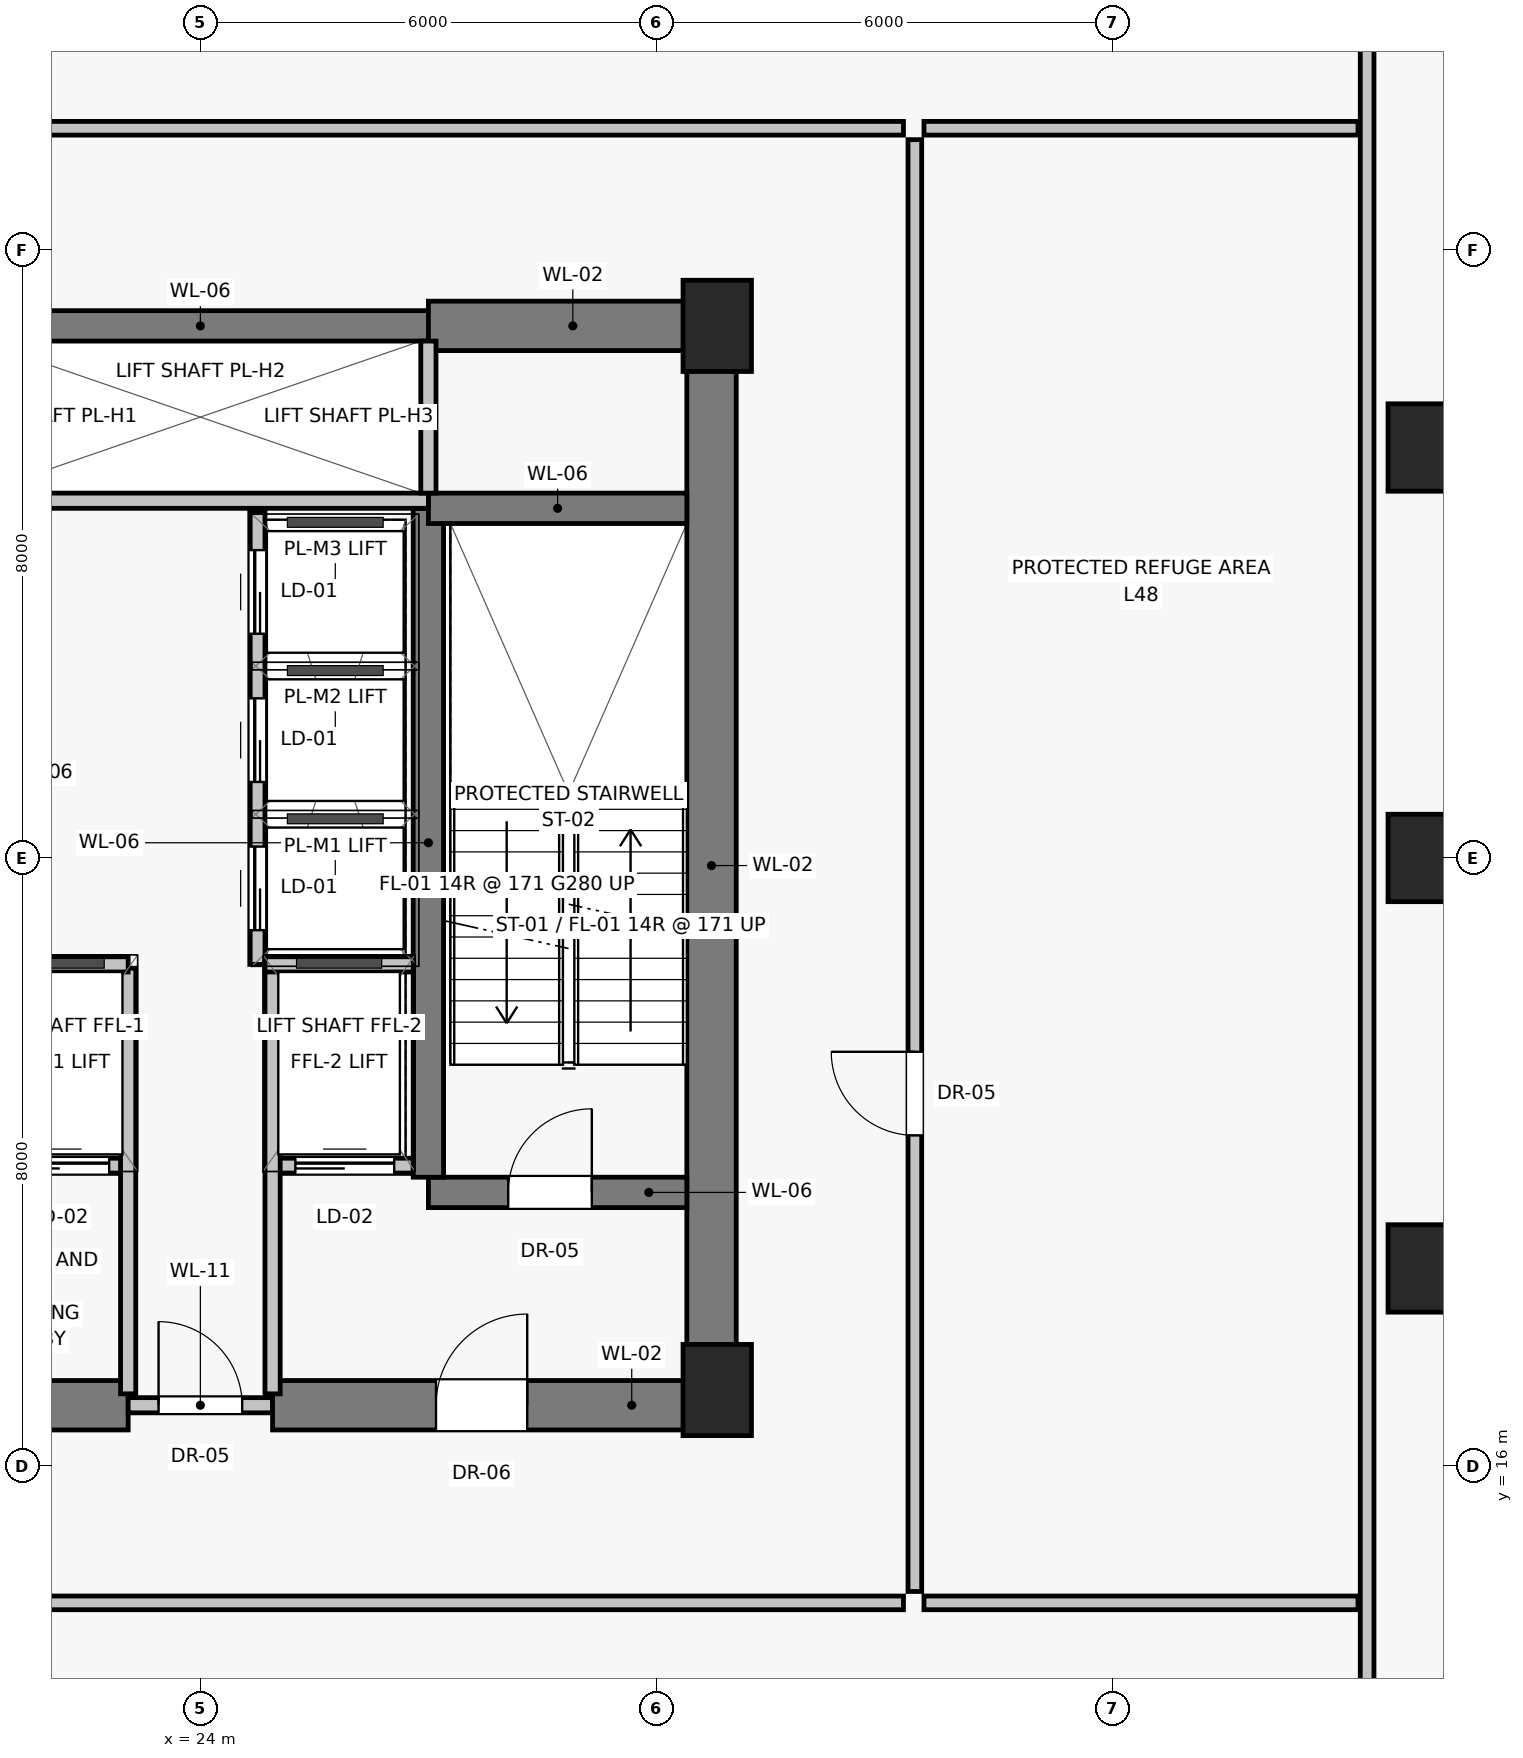
"""IFC4 building model, lengths in metres.
Left out: names, types, materials, properties, quantities, classifications, styles, units other than length and angle.
Written with IfcOpenShell. Run it as: python <this file> out.ifc"""

import sys

from ifc_helpers import new_model, si_unit, direction, frame, frame_2d, origin, origin_2d, place, context, subcontext, project, spatial, rectangle, extrude, source, transform, mapped, element, fill, save


model = new_model("IFC4")
c1 = context("Model", 3, precision=1e-05, world=origin(), true_north=direction((0.0, 1.0)))
c2 = subcontext(c1, "Body", "Model", "MODEL_VIEW")
j1 = project(units=[si_unit("LENGTHUNIT", "METRE"), si_unit("PLANEANGLEUNIT", "RADIAN")], contexts=[c1])
p1 = place(None, origin())
s1 = spatial("IfcSite", under=j1, at=p1, CompositionType="ELEMENT")
p2 = place(p1, origin())
s2 = spatial("IfcBuilding", under=s1, at=p2, CompositionType="ELEMENT")
p3 = place(p2, frame((0.0, 0.0, 169.55)))
s3 = spatial("IfcBuildingStorey", under=s2, at=p3, CompositionType="ELEMENT", Elevation=169.55)
for number, where, z_axis, x_axis in (
    (1, (30.8, 17.0, 0.0), (0.0, 0.0, 1.0), (1.0, 0.0, 0.0)),
    (2, (30.8, 31.0, 0.0), (0.0, 0.0, 1.0), (1.0, 0.0, 0.0)),
):
    element("IfcColumn", number, at=place(p3, frame(where, z_axis=z_axis, x_axis=x_axis)), inside=s3, PredefinedType="PILASTER", context=c2, shape_type="SweptSolid", body=[
        extrude(rectangle(XDim=0.9, YDim=1.2, at=origin_2d()), origin(), (0.0, 0.0, 1.0), 4.8),
    ])
for number, where, z_axis, x_axis in (
    (3, (40.2, 18.6, 0.0), (0.0, 0.0, 1.0), (1.0, 0.0, 0.0)),
    (4, (40.2, 24.0, 0.0), (0.0, 0.0, 1.0), (1.0, 0.0, 0.0)),
    (5, (40.2, 29.4, 0.0), (0.0, 0.0, 1.0), (1.0, 0.0, 0.0)),
):
    element("IfcColumn", number, at=place(p3, frame(where, z_axis=z_axis, x_axis=x_axis)), inside=s3, PredefinedType="COLUMN", context=c2, shape_type="SweptSolid", body=[
        extrude(rectangle(XDim=1.15, YDim=1.15, at=origin_2d()), origin(), (0.0, 0.0, 1.0), 4.8),
    ])
p4 = place(p3, frame((30.725, 16.8, 0.0), z_axis=(0.0, 0.0, 1.0), x_axis=(0.0, 1.0, 0.0)))
e6 = element("IfcWall", 6, at=p4, inside=s3, PredefinedType="SHEAR", context=c2, shape_type="SweptSolid", body=[
    extrude(rectangle(XDim=14.2, YDim=0.65, at=frame_2d((7.1, 0.0))), origin(), (0.0, 0.0, 1.0), 4.48),
])
p5 = place(p3, frame((17.2, 16.8, 0.0), z_axis=(0.0, 0.0, 1.0), x_axis=(1.0, 0.0, 0.0)))
e7 = element("IfcWall", 7, at=p5, inside=s3, PredefinedType="SHEAR", context=c2, shape_type="SweptSolid", body=[
    extrude(rectangle(XDim=5.85, YDim=0.65, at=frame_2d((2.925, 0.0))), origin(), (0.0, 0.0, 1.0), 4.48),
])
p6 = place(p5, frame((1.15, 0.0, 0.0)))
e8 = element("IfcOpeningElement", 8, at=p6, cuts=e7, PredefinedType="OPENING", context=c2, shape_type="SweptSolid", body=[
    extrude(rectangle(XDim=1.2, YDim=2.03, at=frame_2d((0.6, 1.015))), frame((0.0, 0.335, 0.0), z_axis=(0.0, -1.0, 0.0), x_axis=(1.0, 0.0, 0.0)), (0.0, 0.0, 1.0), 0.67),
])
p7 = place(p3, frame((23.05, 16.8, 0.0), z_axis=(0.0, 0.0, 1.0), x_axis=(1.0, 0.0, 0.0)))
e9 = element("IfcWall", 9, at=p7, inside=s3, PredefinedType="SOLIDWALL", context=c2, shape_type="SweptSolid", body=[
    extrude(rectangle(XDim=1.9, YDim=0.2, at=frame_2d((0.95, 0.0))), origin(), (0.0, 0.0, 1.0), 2.28),
])
p8 = place(p7, frame((0.4, 0.0, 0.0)))
e10 = element("IfcOpeningElement", 10, at=p8, cuts=e9, PredefinedType="OPENING", context=c2, shape_type="SweptSolid", body=[
    extrude(rectangle(XDim=1.1, YDim=2.03, at=frame_2d((0.55, 1.015))), frame((0.0, 0.11, 0.0), z_axis=(0.0, -1.0, 0.0), x_axis=(1.0, 0.0, 0.0)), (0.0, 0.0, 1.0), 0.22),
])
p9 = place(p3, frame((24.95, 16.8, 0.0), z_axis=(0.0, 0.0, 1.0), x_axis=(1.0, 0.0, 0.0)))
e11 = element("IfcWall", 11, at=p9, inside=s3, PredefinedType="SHEAR", context=c2, shape_type="SweptSolid", body=[
    extrude(rectangle(XDim=5.85, YDim=0.65, at=frame_2d((2.925, 0.0))), origin(), (0.0, 0.0, 1.0), 4.48),
])
p10 = place(p9, frame((2.15, 0.0, 0.0)))
e12 = element("IfcOpeningElement", 12, at=p10, cuts=e11, PredefinedType="OPENING", context=c2, shape_type="SweptSolid", body=[
    extrude(rectangle(XDim=1.2, YDim=2.03, at=frame_2d((0.6, 1.015))), frame((0.0, 0.335, 0.0), z_axis=(0.0, -1.0, 0.0), x_axis=(1.0, 0.0, 0.0)), (0.0, 0.0, 1.0), 0.67),
])
p11 = place(p3, frame((21.0, 31.0, 0.0), z_axis=(0.0, 0.0, 1.0), x_axis=(1.0, 0.0, 0.0)))
e13 = element("IfcWall", 13, at=p11, inside=s3, PredefinedType="SHEAR", context=c2, shape_type="SweptSolid", body=[
    extrude(rectangle(XDim=6.0, YDim=0.4, at=frame_2d((3.0, 0.0))), origin(), (0.0, 0.0, 1.0), 4.48),
])
p12 = place(p3, frame((27.0, 31.0, 0.0), z_axis=(0.0, 0.0, 1.0), x_axis=(1.0, 0.0, 0.0)))
e14 = element("IfcWall", 14, at=p12, inside=s3, PredefinedType="SHEAR", context=c2, shape_type="SweptSolid", body=[
    extrude(rectangle(XDim=3.8, YDim=0.65, at=frame_2d((1.9, 0.0))), origin(), (0.0, 0.0, 1.0), 4.48),
])
p13 = place(p3, frame((21.2, 19.95, 0.0), z_axis=(0.0, 0.0, 1.0), x_axis=(1.0, 0.0, 0.0)))
e15 = element("IfcWall", 15, at=p13, inside=s3, PredefinedType="SOLIDWALL", context=c2, shape_type="SweptSolid", body=[
    extrude(rectangle(XDim=1.85, YDim=0.2, at=frame_2d((0.925, 0.0))), origin(), (0.0, 0.0, 1.0), 4.48),
])
p14 = place(p13, frame((0.3, 0.0, 0.0)))
e16 = element("IfcOpeningElement", 16, at=p14, cuts=e15, PredefinedType="OPENING", context=c2, shape_type="SweptSolid", body=[
    extrude(rectangle(XDim=1.3, YDim=2.25, at=frame_2d((0.65, 1.125))), frame((0.0, 0.11, 0.0), z_axis=(0.0, -1.0, 0.0), x_axis=(1.0, 0.0, 0.0)), (0.0, 0.0, 1.0), 0.22),
])
p15 = place(p3, frame((24.95, 19.95, 0.0), z_axis=(0.0, 0.0, 1.0), x_axis=(1.0, 0.0, 0.0)))
e17 = element("IfcWall", 17, at=p15, inside=s3, PredefinedType="SOLIDWALL", context=c2, shape_type="SweptSolid", body=[
    extrude(rectangle(XDim=1.85, YDim=0.2, at=frame_2d((0.925, 0.0))), origin(), (0.0, 0.0, 1.0), 4.48),
])
p16 = place(p15, frame((0.3, 0.0, 0.0)))
e18 = element("IfcOpeningElement", 18, at=p16, cuts=e17, PredefinedType="OPENING", context=c2, shape_type="SweptSolid", body=[
    extrude(rectangle(XDim=1.3, YDim=2.25, at=frame_2d((0.65, 1.125))), frame((0.0, 0.11, 0.0), z_axis=(0.0, -1.0, 0.0), x_axis=(1.0, 0.0, 0.0)), (0.0, 0.0, 1.0), 0.22),
])
p17 = place(p3, frame((27.0, 19.6, 0.0), z_axis=(0.0, 0.0, 1.0), x_axis=(1.0, 0.0, 0.0)))
e19 = element("IfcWall", 19, at=p17, inside=s3, PredefinedType="SHEAR", context=c2, shape_type="SweptSolid", body=[
    extrude(rectangle(XDim=3.4, YDim=0.4, at=frame_2d((1.7, 0.0))), origin(), (0.0, 0.0, 1.0), 4.48),
])
p18 = place(p17, frame((1.05, 0.0, 0.0)))
e20 = element("IfcOpeningElement", 20, at=p18, cuts=e19, PredefinedType="OPENING", context=c2, shape_type="SweptSolid", body=[
    extrude(rectangle(XDim=1.1, YDim=2.03, at=frame_2d((0.55, 1.015))), frame((0.0, 0.21, 0.0), z_axis=(0.0, -1.0, 0.0), x_axis=(1.0, 0.0, 0.0)), (0.0, 0.0, 1.0), 0.42),
])
p19 = place(p3, frame((27.0, 19.8, 0.0), z_axis=(0.0, 0.0, 1.0), x_axis=(0.0, 1.0, 0.0)))
e21 = element("IfcWall", 21, at=p19, inside=s3, PredefinedType="SHEAR", context=c2, shape_type="SweptSolid", body=[
    extrude(rectangle(XDim=8.8, YDim=0.4, at=frame_2d((4.4, 0.0))), origin(), (0.0, 0.0, 1.0), 4.48),
])
p20 = place(p3, frame((27.0, 28.6, 0.0), z_axis=(0.0, 0.0, 1.0), x_axis=(1.0, 0.0, 0.0)))
e22 = element("IfcWall", 22, at=p20, inside=s3, PredefinedType="SHEAR", context=c2, shape_type="SweptSolid", body=[
    extrude(rectangle(XDim=3.4, YDim=0.4, at=frame_2d((1.7, 0.0))), origin(), (0.0, 0.0, 1.0), 4.48),
])
for number, where, z_axis, x_axis in (
    (23, (23.05, 16.95, 0.0), (0.0, 0.0, 1.0), (0.0, 1.0, 0.0)),
    (24, (24.95, 16.95, 0.0), (0.0, 0.0, 1.0), (0.0, 1.0, 0.0)),
):
    element("IfcWall", number, at=place(p3, frame(where, z_axis=z_axis, x_axis=x_axis)), inside=s3, PredefinedType="SOLIDWALL", context=c2, shape_type="SweptSolid", body=[
        extrude(rectangle(XDim=5.6, YDim=0.2, at=frame_2d((2.8, 0.0))), origin(), (0.0, 0.0, 1.0), 2.28),
    ])
p21 = place(p3, frame((21.2, 22.6, 0.0), z_axis=(0.0, 0.0, 1.0), x_axis=(1.0, 0.0, 0.0)))
e25 = element("IfcWall", 25, at=p21, inside=s3, PredefinedType="SOLIDWALL", context=c2, shape_type="SweptSolid", body=[
    extrude(rectangle(XDim=1.85, YDim=0.2, at=frame_2d((0.925, 0.0))), origin(), (0.0, 0.0, 1.0), 4.48),
])
p22 = place(p3, frame((24.85, 22.6, 0.0), z_axis=(0.0, 0.0, 1.0), x_axis=(1.0, 0.0, 0.0)))
e26 = element("IfcWall", 26, at=p22, inside=s3, PredefinedType="SOLIDWALL", context=c2, shape_type="SweptSolid", body=[
    extrude(rectangle(XDim=1.95, YDim=0.2, at=frame_2d((0.975, 0.0))), origin(), (0.0, 0.0, 1.0), 4.48),
])
p23 = place(p3, frame((21.0, 28.7, 0.0), z_axis=(0.0, 0.0, 1.0), x_axis=(1.0, 0.0, 0.0)))
e27 = element("IfcWall", 27, at=p23, inside=s3, PredefinedType="SOLIDWALL", context=c2, shape_type="SweptSolid", body=[
    extrude(rectangle(XDim=6.0, YDim=0.2, at=frame_2d((3.0, 0.0))), origin(), (0.0, 0.0, 1.0), 4.48),
])
p24 = place(p3, frame((27.0, 28.8, 0.0), z_axis=(0.0, 0.0, 1.0), x_axis=(0.0, 1.0, 0.0)))
e28 = element("IfcWall", 28, at=p24, inside=s3, PredefinedType="SOLIDWALL", context=c2, shape_type="SweptSolid", body=[
    extrude(rectangle(XDim=2.0, YDim=0.2, at=frame_2d((1.0, 0.0))), origin(), (0.0, 0.0, 1.0), 4.48),
])
p25 = place(p3, frame((24.75, 22.6, 0.0), z_axis=(0.0, 0.0, 1.0), x_axis=(0.0, 1.0, 0.0)))
e29 = element("IfcWall", 29, at=p25, inside=s3, PredefinedType="SOLIDWALL", context=c2, shape_type="SweptSolid", body=[
    extrude(rectangle(XDim=5.95, YDim=0.2, at=frame_2d((2.975, 0.0))), origin(), (0.0, 0.0, 1.0), 4.48),
])
p26 = place(p25, frame((0.45, 0.0, 0.0)))
e30 = element("IfcOpeningElement", 30, at=p26, cuts=e29, PredefinedType="OPENING", context=c2, shape_type="SweptSolid", body=[
    extrude(rectangle(XDim=1.1, YDim=2.08, at=frame_2d((0.55, 1.04))), frame((0.0, 0.11, 0.0), z_axis=(0.0, -1.0, 0.0), x_axis=(1.0, 0.0, 0.0)), (0.0, 0.0, 1.0), 0.22),
])
p27 = place(p25, frame((2.4, 0.0, 0.0)))
e31 = element("IfcOpeningElement", 31, at=p27, cuts=e29, PredefinedType="OPENING", context=c2, shape_type="SweptSolid", body=[
    extrude(rectangle(XDim=1.1, YDim=2.08, at=frame_2d((0.55, 1.04))), frame((0.0, 0.11, 0.0), z_axis=(0.0, -1.0, 0.0), x_axis=(1.0, 0.0, 0.0)), (0.0, 0.0, 1.0), 0.22),
])
p28 = place(p25, frame((4.35, 0.0, 0.0)))
e32 = element("IfcOpeningElement", 32, at=p28, cuts=e29, PredefinedType="OPENING", context=c2, shape_type="SweptSolid", body=[
    extrude(rectangle(XDim=1.1, YDim=2.08, at=frame_2d((0.55, 1.04))), frame((0.0, 0.11, 0.0), z_axis=(0.0, -1.0, 0.0), x_axis=(1.0, 0.0, 0.0)), (0.0, 0.0, 1.0), 0.22),
])
p29 = place(p3, frame((14.75, 14.2, 0.0), z_axis=(0.0, 0.0, 1.0), x_axis=(1.0, 0.0, 0.0)))
e33 = element("IfcWall", 33, at=p29, inside=s3, PredefinedType="PARTITIONING", context=c2, shape_type="SweptSolid", body=[
    extrude(rectangle(XDim=18.5, YDim=0.18, at=frame_2d((9.25, 0.0))), origin(), (0.0, 0.0, 1.0), 4.48),
])
p30 = place(p29, frame((6.0, 0.0, 0.0)))
e34 = element("IfcOpeningElement", 34, at=p30, cuts=e33, PredefinedType="OPENING", context=c2, shape_type="SweptSolid", body=[
    extrude(rectangle(XDim=1.1, YDim=2.03, at=frame_2d((0.55, 1.015))), frame((0.0, 0.1, 0.0), z_axis=(0.0, -1.0, 0.0), x_axis=(1.0, 0.0, 0.0)), (0.0, 0.0, 1.0), 0.2),
])
p31 = place(p3, frame((33.4, 14.35, 0.0), z_axis=(0.0, 0.0, 1.0), x_axis=(0.0, 1.0, 0.0)))
e35 = element("IfcWall", 35, at=p31, inside=s3, PredefinedType="PARTITIONING", context=c2, shape_type="SweptSolid", body=[
    extrude(rectangle(XDim=19.1, YDim=0.18, at=frame_2d((9.55, 0.0))), origin(), (0.0, 0.0, 1.0), 4.48),
])
p32 = place(p31, frame((6.0, 0.0, 0.0)))
e36 = element("IfcOpeningElement", 36, at=p32, cuts=e35, PredefinedType="OPENING", context=c2, shape_type="SweptSolid", body=[
    extrude(rectangle(XDim=1.1, YDim=2.03, at=frame_2d((0.55, 1.015))), frame((0.0, 0.1, 0.0), z_axis=(0.0, -1.0, 0.0), x_axis=(1.0, 0.0, 0.0)), (0.0, 0.0, 1.0), 0.2),
])
p33 = place(p3, frame((14.75, 33.6, 0.0), z_axis=(0.0, 0.0, 1.0), x_axis=(1.0, 0.0, 0.0)))
e37 = element("IfcWall", 37, at=p33, inside=s3, PredefinedType="PARTITIONING", context=c2, shape_type="SweptSolid", body=[
    extrude(rectangle(XDim=18.5, YDim=0.18, at=frame_2d((9.25, 0.0))), origin(), (0.0, 0.0, 1.0), 4.48),
])
p34 = place(p33, frame((6.0, 0.0, 0.0)))
e38 = element("IfcOpeningElement", 38, at=p34, cuts=e37, PredefinedType="OPENING", context=c2, shape_type="SweptSolid", body=[
    extrude(rectangle(XDim=1.1, YDim=2.03, at=frame_2d((0.55, 1.015))), frame((0.0, 0.1, 0.0), z_axis=(0.0, -1.0, 0.0), x_axis=(1.0, 0.0, 0.0)), (0.0, 0.0, 1.0), 0.2),
])
p35 = place(p3, frame((39.35, 8.77, 0.0), z_axis=(0.0, 0.0, 1.0), x_axis=(0.0, 1.0, 0.0)))
e39 = element("IfcWall", 39, at=p35, inside=s3, PredefinedType="PARTITIONING", context=c2, shape_type="SweptSolid", body=[
    extrude(rectangle(XDim=30.46, YDim=0.18, at=frame_2d((15.23, 0.0))), origin(), (0.0, 0.0, 1.0), 2.28),
])
for number, where, z_axis, x_axis in (
    (40, (33.52, 14.2, 0.0), (0.0, 0.0, 1.0), (1.0, 0.0, 0.0)),
    (41, (33.52, 33.6, 0.0), (0.0, 0.0, 1.0), (1.0, 0.0, 0.0)),
):
    element("IfcWall", number, at=place(p3, frame(where, z_axis=z_axis, x_axis=x_axis)), inside=s3, PredefinedType="PARTITIONING", context=c2, shape_type="SweptSolid", body=[
        extrude(rectangle(XDim=5.71, YDim=0.18, at=frame_2d((2.855, 0.0))), origin(), (0.0, 0.0, 1.0), 4.48),
    ])
m1 = source(origin(), c2, "Body", "SweptSolid", [
    extrude(rectangle(XDim=1.1, YDim=2.03, at=frame_2d((0.55, 1.015))), frame((0.0, 0.025, 0.0), z_axis=(0.0, -1.0, 0.0), x_axis=(1.0, 0.0, 0.0)), (0.0, 0.0, 1.0), 0.05),
])
p36 = place(p8, origin())
e42 = element("IfcDoor", 42, at=p36, inside=s3, OperationType="SINGLE_SWING_LEFT", PredefinedType="DOOR", context=c2, shape_type="MappedRepresentation", body=[
    mapped(m1, transform((0.0, 0.0, 0.0), scale=1.0)),
])
fill(e10, e42)
m2 = source(origin(), c2, "Body", "SweptSolid", [
    extrude(rectangle(XDim=1.2, YDim=2.03, at=frame_2d((0.6, 1.015))), frame((0.0, 0.025, 0.0), z_axis=(0.0, -1.0, 0.0), x_axis=(1.0, 0.0, 0.0)), (0.0, 0.0, 1.0), 0.05),
])
p37 = place(p10, origin())
e43 = element("IfcDoor", 43, at=p37, inside=s3, OperationType="SINGLE_SWING_RIGHT", PredefinedType="DOOR", context=c2, shape_type="MappedRepresentation", body=[
    mapped(m2, transform((0.0, 0.0, 0.0), scale=1.0)),
])
fill(e12, e43)
m3 = source(origin(), c2, "Body", "SweptSolid", [
    extrude(rectangle(XDim=1.3, YDim=2.25, at=frame_2d((0.65, 1.125))), frame((0.0, 0.025, 0.0), z_axis=(0.0, -1.0, 0.0), x_axis=(1.0, 0.0, 0.0)), (0.0, 0.0, 1.0), 0.05),
])
p38 = place(p14, origin())
e44 = element("IfcDoor", 44, at=p38, inside=s3, OperationType="SLIDING_TO_LEFT", PredefinedType="DOOR", context=c2, shape_type="MappedRepresentation", body=[
    mapped(m3, transform((0.0, 0.0, 0.0), scale=1.0)),
])
fill(e16, e44)
p39 = place(p16, origin())
e45 = element("IfcDoor", 45, at=p39, inside=s3, OperationType="SLIDING_TO_LEFT", PredefinedType="DOOR", context=c2, shape_type="MappedRepresentation", body=[
    mapped(m3, transform((0.0, 0.0, 0.0), scale=1.0)),
])
fill(e18, e45)
p40 = place(p18, origin())
e46 = element("IfcDoor", 46, at=p40, inside=s3, OperationType="SINGLE_SWING_RIGHT", PredefinedType="DOOR", context=c2, shape_type="MappedRepresentation", body=[
    mapped(m1, transform((0.0, 0.0, 0.0), scale=1.0)),
])
fill(e20, e46)
m4 = source(origin(), c2, "Body", "SweptSolid", [
    extrude(rectangle(XDim=1.1, YDim=2.08, at=frame_2d((0.55, 1.04))), frame((0.0, 0.025, 0.0), z_axis=(0.0, -1.0, 0.0), x_axis=(1.0, 0.0, 0.0)), (0.0, 0.0, 1.0), 0.05),
])
p41 = place(p26, origin())
e47 = element("IfcDoor", 47, at=p41, inside=s3, OperationType="SLIDING_TO_LEFT", PredefinedType="DOOR", context=c2, shape_type="MappedRepresentation", body=[
    mapped(m4, transform((0.0, 0.0, 0.0), scale=1.0)),
])
fill(e30, e47)
p42 = place(p27, origin())
e48 = element("IfcDoor", 48, at=p42, inside=s3, OperationType="SLIDING_TO_LEFT", PredefinedType="DOOR", context=c2, shape_type="MappedRepresentation", body=[
    mapped(m4, transform((0.0, 0.0, 0.0), scale=1.0)),
])
fill(e31, e48)
p43 = place(p28, origin())
e49 = element("IfcDoor", 49, at=p43, inside=s3, OperationType="SLIDING_TO_LEFT", PredefinedType="DOOR", context=c2, shape_type="MappedRepresentation", body=[
    mapped(m4, transform((0.0, 0.0, 0.0), scale=1.0)),
])
fill(e32, e49)
p44 = place(p32, origin())
e50 = element("IfcDoor", 50, at=p44, inside=s3, OperationType="SINGLE_SWING_RIGHT", PredefinedType="DOOR", context=c2, shape_type="MappedRepresentation", body=[
    mapped(m1, transform((0.0, 0.0, 0.0), scale=1.0)),
])
fill(e36, e50)
save(model, sys.argv[1])
